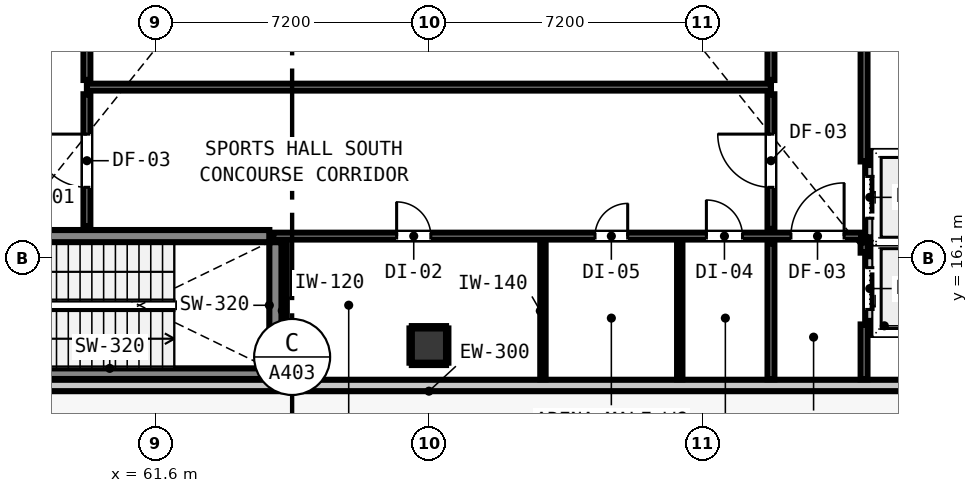
"""IFC4 building model, lengths in metres.
Left out: names, types, materials, properties, quantities, classifications, styles, units other than length and angle.
Written with IfcOpenShell. Run it as: python <this file> out.ifc"""

import sys

from ifc_helpers import new_model, si_unit, direction, frame, frame_2d, origin, origin_2d, place, context, subcontext, project, spatial, rectangle, circle, extrude, element, fill, save


model = new_model("IFC4")
c1 = context("Model", 3, precision=1e-05, world=origin(), true_north=direction((0.0, 1.0)))
c2 = subcontext(c1, "Body", "Model", "MODEL_VIEW")
j1 = project(units=[si_unit("LENGTHUNIT", "METRE"), si_unit("PLANEANGLEUNIT", "RADIAN")], contexts=[c1])
p1 = place(None, origin())
s1 = spatial("IfcSite", under=j1, at=p1, CompositionType="ELEMENT")
p2 = place(p1, origin())
s2 = spatial("IfcBuilding", under=s1, at=p2, CompositionType="ELEMENT")
p3 = place(p2, origin())
s3 = spatial("IfcBuildingStorey", under=s2, at=p3, CompositionType="ELEMENT", Elevation=0.0)
p4 = place(p3, frame((64.76, 13.2, 0.0), z_axis=(0.0, 0.0, 1.0), x_axis=(0.0, 1.0, 0.0)))
e1 = element("IfcWall", 1, at=p4, inside=s3, PredefinedType="SHEAR", context=c2, shape_type="SweptSolid", body=[
    extrude(rectangle(XDim=3.32, YDim=0.32, at=frame_2d((1.66, 0.0))), origin(), (0.0, 0.0, 1.0), 5.2),
])
p5 = place(p3, frame((56.2, 13.06, 0.0), z_axis=(0.0, 0.0, 1.0), x_axis=(1.0, 0.0, 0.0)))
e2 = element("IfcWall", 2, at=p5, inside=s3, PredefinedType="SHEAR", context=c2, shape_type="SweptSolid", body=[
    extrude(rectangle(XDim=8.4, YDim=0.28, at=frame_2d((4.2, 0.0))), origin(), (0.0, 0.0, 1.0), 5.2),
])
p6 = place(p3, frame((56.2, 16.68, 0.0), z_axis=(0.0, 0.0, 1.0), x_axis=(1.0, 0.0, 0.0)))
e3 = element("IfcWall", 3, at=p6, inside=s3, PredefinedType="SHEAR", context=c2, shape_type="SweptSolid", body=[
    extrude(rectangle(XDim=8.4, YDim=0.32, at=frame_2d((4.2, 0.0))), origin(), (0.0, 0.0, 1.0), 5.2),
])
p7 = place(p6, frame((0.23, 0.0, 0.0)))
e4 = element("IfcOpeningElement", 4, at=p7, cuts=e3, PredefinedType="OPENING", context=c2, shape_type="SweptSolid", body=[
    extrude(rectangle(XDim=1.1, YDim=2.15, at=frame_2d((0.55, 1.075))), frame((0.0, 0.17, 0.0), z_axis=(0.0, -1.0, 0.0), x_axis=(1.0, 0.0, 0.0)), (0.0, 0.0, 1.0), 0.34),
])
p8 = place(p3, frame((68.8, 13.8, 0.0), z_axis=(0.0, 0.0, 1.0), x_axis=(1.0, 0.0, 0.0)))
e5 = element("IfcColumn", 5, at=p8, inside=s3, PredefinedType="COLUMN", context=c2, shape_type="SweptSolid", body=[
    extrude(circle(Radius=0.45, at=origin_2d()), origin(), (0.0, 0.0, 1.0), 5.2),
])
p9 = place(p3, frame((83.05, 12.75, 0.0), z_axis=(0.0, 0.0, 1.0), x_axis=(-1.0, 0.0, 0.0)))
e6 = element("IfcWall", 6, at=p9, inside=s3, PredefinedType="STANDARD", context=c2, shape_type="SweptSolid", body=[
    extrude(rectangle(XDim=28.5, YDim=0.3, at=frame_2d((14.25, 0.0))), origin(), (0.0, 0.0, 1.0), 4.92),
])
p10 = place(p3, frame((80.4, 14.2, 0.0), z_axis=(0.0, 0.0, 1.0), x_axis=(1.0, 0.0, 0.0)))
e7 = element("IfcWall", 7, at=p10, inside=s3, PredefinedType="PARTITIONING", context=c2, shape_type="SweptSolid", body=[
    extrude(rectangle(XDim=0.768, YDim=0.24, at=frame_2d((0.384, 0.0))), origin(), (0.0, 0.0, 1.0), 4.155),
])
p11 = place(p3, frame((80.4, 16.4, 0.0), z_axis=(0.0, 0.0, 1.0), x_axis=(1.0, 0.0, 0.0)))
e8 = element("IfcWall", 8, at=p11, inside=s3, PredefinedType="PARTITIONING", context=c2, shape_type="SweptSolid", body=[
    extrude(rectangle(XDim=2.2, YDim=0.24, at=frame_2d((1.1, 0.0))), origin(), (0.0, 0.0, 1.0), 4.92),
])
p12 = place(p3, frame((80.4, 14.448, 0.0), z_axis=(0.0, 0.0, 1.0), x_axis=(0.0, 1.0, 0.0)))
e9 = element("IfcWall", 9, at=p12, inside=s3, PredefinedType="PARTITIONING", context=c2, shape_type="SweptSolid", body=[
    extrude(rectangle(XDim=1.704, YDim=0.24, at=frame_2d((0.852, 0.0))), origin(), (0.0, 0.0, 1.0), 4.92),
])
p13 = place(p12, frame((0.302, 0.0, 0.0)))
e10 = element("IfcOpeningElement", 10, at=p13, cuts=e9, PredefinedType="OPENING", context=c2, shape_type="SweptSolid", body=[
    extrude(rectangle(XDim=1.1, YDim=2.15, at=frame_2d((0.55, 1.075))), frame((0.0, 0.13, 0.0), z_axis=(0.0, -1.0, 0.0), x_axis=(1.0, 0.0, 0.0)), (0.0, 0.0, 1.0), 0.26),
])
p14 = place(p3, frame((80.4, 18.8, 0.0), z_axis=(0.0, 0.0, 1.0), x_axis=(1.0, 0.0, 0.0)))
e11 = element("IfcWall", 11, at=p14, inside=s3, PredefinedType="PARTITIONING", context=c2, shape_type="SweptSolid", body=[
    extrude(rectangle(XDim=2.2, YDim=0.24, at=frame_2d((1.1, 0.0))), origin(), (0.0, 0.0, 1.0), 4.92),
])
p15 = place(p3, frame((80.4, 16.648, 0.0), z_axis=(0.0, 0.0, 1.0), x_axis=(0.0, 1.0, 0.0)))
e12 = element("IfcWall", 12, at=p15, inside=s3, PredefinedType="PARTITIONING", context=c2, shape_type="SweptSolid", body=[
    extrude(rectangle(XDim=1.904, YDim=0.24, at=frame_2d((0.952, 0.0))), origin(), (0.0, 0.0, 1.0), 4.92),
])
p16 = place(p15, frame((0.502, 0.0, 0.0)))
e13 = element("IfcOpeningElement", 13, at=p16, cuts=e12, PredefinedType="OPENING", context=c2, shape_type="SweptSolid", body=[
    extrude(rectangle(XDim=1.1, YDim=2.15, at=frame_2d((0.55, 1.075))), frame((0.0, 0.13, 0.0), z_axis=(0.0, -1.0, 0.0), x_axis=(1.0, 0.0, 0.0)), (0.0, 0.0, 1.0), 0.26),
])
p17 = place(p3, frame((64.7, 16.68, 0.0), z_axis=(0.0, 0.0, 1.0), x_axis=(1.0, 0.0, 0.0)))
e14 = element("IfcWall", 14, at=p17, inside=s3, PredefinedType="PARTITIONING", context=c2, shape_type="SweptSolid", body=[
    extrude(rectangle(XDim=15.482, YDim=0.18, at=frame_2d((7.741, 0.0))), origin(), (0.0, 0.0, 1.0), 4.92),
])
p18 = place(p17, frame((13.625, 0.0, 0.0)))
e15 = element("IfcOpeningElement", 15, at=p18, cuts=e14, PredefinedType="OPENING", context=c2, shape_type="SweptSolid", body=[
    extrude(rectangle(XDim=1.4, YDim=2.15, at=frame_2d((0.7, 1.075))), frame((0.0, 0.1, 0.0), z_axis=(0.0, -1.0, 0.0), x_axis=(1.0, 0.0, 0.0)), (0.0, 0.0, 1.0), 0.2),
])
p19 = place(p17, frame((3.25, 0.0, 0.0)))
e16 = element("IfcOpeningElement", 16, at=p19, cuts=e14, PredefinedType="OPENING", context=c2, shape_type="SweptSolid", body=[
    extrude(rectangle(XDim=0.9, YDim=2.1, at=frame_2d((0.45, 1.05))), frame((0.0, 0.1, 0.0), z_axis=(0.0, -1.0, 0.0), x_axis=(1.0, 0.0, 0.0)), (0.0, 0.0, 1.0), 0.2),
])
p20 = place(p17, frame((8.47, 0.0, 0.0)))
e17 = element("IfcOpeningElement", 17, at=p20, cuts=e14, PredefinedType="OPENING", context=c2, shape_type="SweptSolid", body=[
    extrude(rectangle(XDim=0.86, YDim=2.02, at=frame_2d((0.43, 1.01))), frame((0.0, 0.1, 0.0), z_axis=(0.0, -1.0, 0.0), x_axis=(1.0, 0.0, 0.0)), (0.0, 0.0, 1.0), 0.2),
])
p21 = place(p17, frame((11.401, 0.0, 0.0)))
e18 = element("IfcOpeningElement", 18, at=p21, cuts=e14, PredefinedType="OPENING", context=c2, shape_type="SweptSolid", body=[
    extrude(rectangle(XDim=0.95, YDim=2.1, at=frame_2d((0.475, 1.05))), frame((0.0, 0.1, 0.0), z_axis=(0.0, -1.0, 0.0), x_axis=(1.0, 0.0, 0.0)), (0.0, 0.0, 1.0), 0.2),
])
p22 = place(p3, frame((59.8, 20.6, 0.0), z_axis=(0.0, 0.0, 1.0), x_axis=(1.0, 0.0, 0.0)))
e19 = element("IfcWall", 19, at=p22, inside=s3, PredefinedType="PARTITIONING", context=c2, shape_type="SweptSolid", body=[
    extrude(rectangle(XDim=18.0, YDim=0.18, at=frame_2d((9.0, 0.0))), origin(), (0.0, 0.0, 1.0), 4.92),
])
p23 = place(p3, frame((59.8, 16.94, 0.0), z_axis=(0.0, 0.0, 1.0), x_axis=(0.0, 1.0, 0.0)))
e20 = element("IfcWall", 20, at=p23, inside=s3, PredefinedType="PARTITIONING", context=c2, shape_type="SweptSolid", body=[
    extrude(rectangle(XDim=3.472, YDim=0.18, at=frame_2d((1.736, 0.0))), origin(), (0.0, 0.0, 1.0), 4.92),
])
p24 = place(p23, frame((1.024, 0.0, 0.0)))
e21 = element("IfcOpeningElement", 21, at=p24, cuts=e20, PredefinedType="OPENING", context=c2, shape_type="SweptSolid", body=[
    extrude(rectangle(XDim=1.4, YDim=2.15, at=frame_2d((0.7, 1.075))), frame((0.0, 0.1, 0.0), z_axis=(0.0, -1.0, 0.0), x_axis=(1.0, 0.0, 0.0)), (0.0, 0.0, 1.0), 0.2),
])
p25 = place(p3, frame((59.8, 20.788, 0.0), z_axis=(0.0, 0.0, 1.0), x_axis=(0.0, 1.0, 0.0)))
e22 = element("IfcWall", 22, at=p25, inside=s3, PredefinedType="PARTITIONING", context=c2, shape_type="SweptSolid", body=[
    extrude(rectangle(XDim=19.624, YDim=0.18, at=frame_2d((9.812, 0.0))), origin(), (0.0, 0.0, 1.0), 4.92),
])
p26 = place(p25, frame((9.362, 0.0, 0.0)))
e23 = element("IfcOpeningElement", 23, at=p26, cuts=e22, PredefinedType="OPENING", context=c2, shape_type="SweptSolid", body=[
    extrude(rectangle(XDim=0.9, YDim=2.1, at=frame_2d((0.45, 1.05))), frame((0.0, 0.1, 0.0), z_axis=(0.0, -1.0, 0.0), x_axis=(1.0, 0.0, 0.0)), (0.0, 0.0, 1.0), 0.2),
])
p27 = place(p3, frame((77.8, 12.912, 0.0), z_axis=(0.0, 0.0, 1.0), x_axis=(0.0, 1.0, 0.0)))
e24 = element("IfcWall", 24, at=p27, inside=s3, PredefinedType="PARTITIONING", context=c2, shape_type="SweptSolid", body=[
    extrude(rectangle(XDim=3.58, YDim=0.18, at=frame_2d((1.79, 0.0))), origin(), (0.0, 0.0, 1.0), 4.92),
])
p28 = place(p3, frame((77.8, 16.868, 0.0), z_axis=(0.0, 0.0, 1.0), x_axis=(0.0, 1.0, 0.0)))
e25 = element("IfcWall", 25, at=p28, inside=s3, PredefinedType="PARTITIONING", context=c2, shape_type="SweptSolid", body=[
    extrude(rectangle(XDim=3.544, YDim=0.18, at=frame_2d((1.772, 0.0))), origin(), (0.0, 0.0, 1.0), 4.92),
])
p29 = place(p28, frame((1.096, 0.0, 0.0)))
e26 = element("IfcOpeningElement", 26, at=p29, cuts=e25, PredefinedType="OPENING", context=c2, shape_type="SweptSolid", body=[
    extrude(rectangle(XDim=1.4, YDim=2.15, at=frame_2d((0.7, 1.075))), frame((0.0, 0.1, 0.0), z_axis=(0.0, -1.0, 0.0), x_axis=(1.0, 0.0, 0.0)), (0.0, 0.0, 1.0), 0.2),
])
p30 = place(p3, frame((77.8, 20.788, 0.0), z_axis=(0.0, 0.0, 1.0), x_axis=(0.0, 1.0, 0.0)))
e27 = element("IfcWall", 27, at=p30, inside=s3, PredefinedType="PARTITIONING", context=c2, shape_type="SweptSolid", body=[
    extrude(rectangle(XDim=19.624, YDim=0.18, at=frame_2d((9.812, 0.0))), origin(), (0.0, 0.0, 1.0), 4.92),
])
p31 = place(p3, frame((80.25, 12.912, 0.0), z_axis=(0.0, 0.0, 1.0), x_axis=(0.0, 1.0, 0.0)))
e28 = element("IfcWall", 28, at=p31, inside=s3, PredefinedType="PARTITIONING", context=c2, shape_type="SweptSolid", body=[
    extrude(rectangle(XDim=1.443, YDim=0.18, at=frame_2d((0.721, 0.0))), origin(), (0.0, 0.0, 1.0), 4.92),
])
p32 = place(p3, frame((80.25, 16.245, 0.0), z_axis=(0.0, 0.0, 1.0), x_axis=(0.0, 1.0, 0.0)))
e29 = element("IfcWall", 29, at=p32, inside=s3, PredefinedType="PARTITIONING", context=c2, shape_type="SweptSolid", body=[
    extrude(rectangle(XDim=0.275, YDim=0.18, at=frame_2d((0.137, 0.0))), origin(), (0.0, 0.0, 1.0), 4.92),
])
p33 = place(p3, frame((80.25, 18.645, 0.0), z_axis=(0.0, 0.0, 1.0), x_axis=(0.0, 1.0, 0.0)))
e30 = element("IfcWall", 30, at=p33, inside=s3, PredefinedType="PARTITIONING", context=c2, shape_type="SweptSolid", body=[
    extrude(rectangle(XDim=25.687, YDim=0.18, at=frame_2d((12.844, 0.0))), origin(), (0.0, 0.0, 1.0), 4.92),
])
for number, where, z_axis, x_axis in (
    (31, (71.8, 12.912, 0.0), (0.0, 0.0, 1.0), (0.0, 1.0, 0.0)),
    (32, (75.4, 12.912, 0.0), (0.0, 0.0, 1.0), (0.0, 1.0, 0.0)),
):
    element("IfcWall", number, at=place(p3, frame(where, z_axis=z_axis, x_axis=x_axis)), inside=s3, PredefinedType="PARTITIONING", context=c2, shape_type="SweptSolid", body=[
        extrude(rectangle(XDim=3.6, YDim=0.14, at=frame_2d((1.8, 0.0))), origin(), (0.0, 0.0, 1.0), 4.92),
    ])
p34 = place(p3, frame((65.0, 12.912, 0.0), z_axis=(0.0, 0.0, 1.0), x_axis=(0.0, 1.0, 0.0)))
e33 = element("IfcWall", 33, at=p34, inside=s3, PredefinedType="PARTITIONING", context=c2, shape_type="SweptSolid", body=[
    extrude(rectangle(XDim=3.61, YDim=0.12, at=frame_2d((1.805, 0.0))), origin(), (0.0, 0.0, 1.0), 4.92),
])
for number, where, z_axis, x_axis in (
    (34, (68.35, 13.318, 0.0), (0.0, 0.0, 1.0), (1.0, 0.0, 0.0)),
    (35, (68.35, 14.282, 0.0), (0.0, 0.0, 1.0), (1.0, 0.0, 0.0)),
    (36, (68.318, 13.35, 0.0), (0.0, 0.0, 1.0), (0.0, 1.0, 0.0)),
    (37, (69.282, 13.35, 0.0), (0.0, 0.0, 1.0), (0.0, 1.0, 0.0)),
):
    element("IfcWall", number, at=place(p3, frame(where, z_axis=z_axis, x_axis=x_axis)), inside=s3, PredefinedType="PARTITIONING", context=c2, shape_type="SweptSolid", body=[
        extrude(rectangle(XDim=0.9, YDim=0.06, at=frame_2d((0.45, 0.0))), origin(), (0.0, 0.0, 1.0), 1.45),
    ])
p35 = place(p13, origin())
e38 = element("IfcDoor", 38, at=p35, inside=s3, OperationType="SLIDING_TO_LEFT", PredefinedType="DOOR", context=c2, shape_type="SweptSolid", body=[
    extrude(rectangle(XDim=1.1, YDim=2.15, at=frame_2d((0.55, 1.075))), frame((0.0, 0.025, 0.0), z_axis=(0.0, -1.0, 0.0), x_axis=(1.0, 0.0, 0.0)), (0.0, 0.0, 1.0), 0.05),
])
fill(e10, e38)
p36 = place(p16, origin())
e39 = element("IfcDoor", 39, at=p36, inside=s3, OperationType="SLIDING_TO_RIGHT", PredefinedType="DOOR", context=c2, shape_type="SweptSolid", body=[
    extrude(rectangle(XDim=1.1, YDim=2.15, at=frame_2d((0.55, 1.075))), frame((0.0, 0.025, 0.0), z_axis=(0.0, -1.0, 0.0), x_axis=(1.0, 0.0, 0.0)), (0.0, 0.0, 1.0), 0.05),
])
fill(e13, e39)
p37 = place(p24, origin())
e40 = element("IfcDoor", 40, at=p37, inside=s3, OperationType="SINGLE_SWING_RIGHT", PredefinedType="DOOR", context=c2, shape_type="SweptSolid", body=[
    extrude(rectangle(XDim=1.4, YDim=2.15, at=frame_2d((0.7, 1.075))), frame((0.0, 0.025, 0.0), z_axis=(0.0, -1.0, 0.0), x_axis=(1.0, 0.0, 0.0)), (0.0, 0.0, 1.0), 0.05),
])
fill(e21, e40)
p38 = place(p29, origin())
e41 = element("IfcDoor", 41, at=p38, inside=s3, OperationType="SINGLE_SWING_RIGHT", PredefinedType="DOOR", context=c2, shape_type="SweptSolid", body=[
    extrude(rectangle(XDim=1.4, YDim=2.15, at=frame_2d((0.7, 1.075))), frame((0.0, 0.025, 0.0), z_axis=(0.0, -1.0, 0.0), x_axis=(1.0, 0.0, 0.0)), (0.0, 0.0, 1.0), 0.05),
])
fill(e26, e41)
p39 = place(p18, origin())
e42 = element("IfcDoor", 42, at=p39, inside=s3, OperationType="SINGLE_SWING_RIGHT", PredefinedType="DOOR", context=c2, shape_type="SweptSolid", body=[
    extrude(rectangle(XDim=1.4, YDim=2.15, at=frame_2d((0.7, 1.075))), frame((0.0, 0.025, 0.0), z_axis=(0.0, -1.0, 0.0), x_axis=(1.0, 0.0, 0.0)), (0.0, 0.0, 1.0), 0.05),
])
fill(e15, e42)
p40 = place(p19, origin())
e43 = element("IfcDoor", 43, at=p40, inside=s3, OperationType="SINGLE_SWING_LEFT", PredefinedType="DOOR", context=c2, shape_type="SweptSolid", body=[
    extrude(rectangle(XDim=0.9, YDim=2.1, at=frame_2d((0.45, 1.05))), frame((0.0, 0.025, 0.0), z_axis=(0.0, -1.0, 0.0), x_axis=(1.0, 0.0, 0.0)), (0.0, 0.0, 1.0), 0.05),
])
fill(e16, e43)
p41 = place(p20, origin())
e44 = element("IfcDoor", 44, at=p41, inside=s3, OperationType="SINGLE_SWING_RIGHT", PredefinedType="DOOR", context=c2, shape_type="SweptSolid", body=[
    extrude(rectangle(XDim=0.86, YDim=2.02, at=frame_2d((0.43, 1.01))), frame((0.0, 0.025, 0.0), z_axis=(0.0, -1.0, 0.0), x_axis=(1.0, 0.0, 0.0)), (0.0, 0.0, 1.0), 0.05),
])
fill(e17, e44)
p42 = place(p21, origin())
e45 = element("IfcDoor", 45, at=p42, inside=s3, OperationType="SINGLE_SWING_LEFT", PredefinedType="DOOR", context=c2, shape_type="SweptSolid", body=[
    extrude(rectangle(XDim=0.95, YDim=2.1, at=frame_2d((0.475, 1.05))), frame((0.0, 0.025, 0.0), z_axis=(0.0, -1.0, 0.0), x_axis=(1.0, 0.0, 0.0)), (0.0, 0.0, 1.0), 0.05),
])
fill(e18, e45)
save(model, sys.argv[1])
